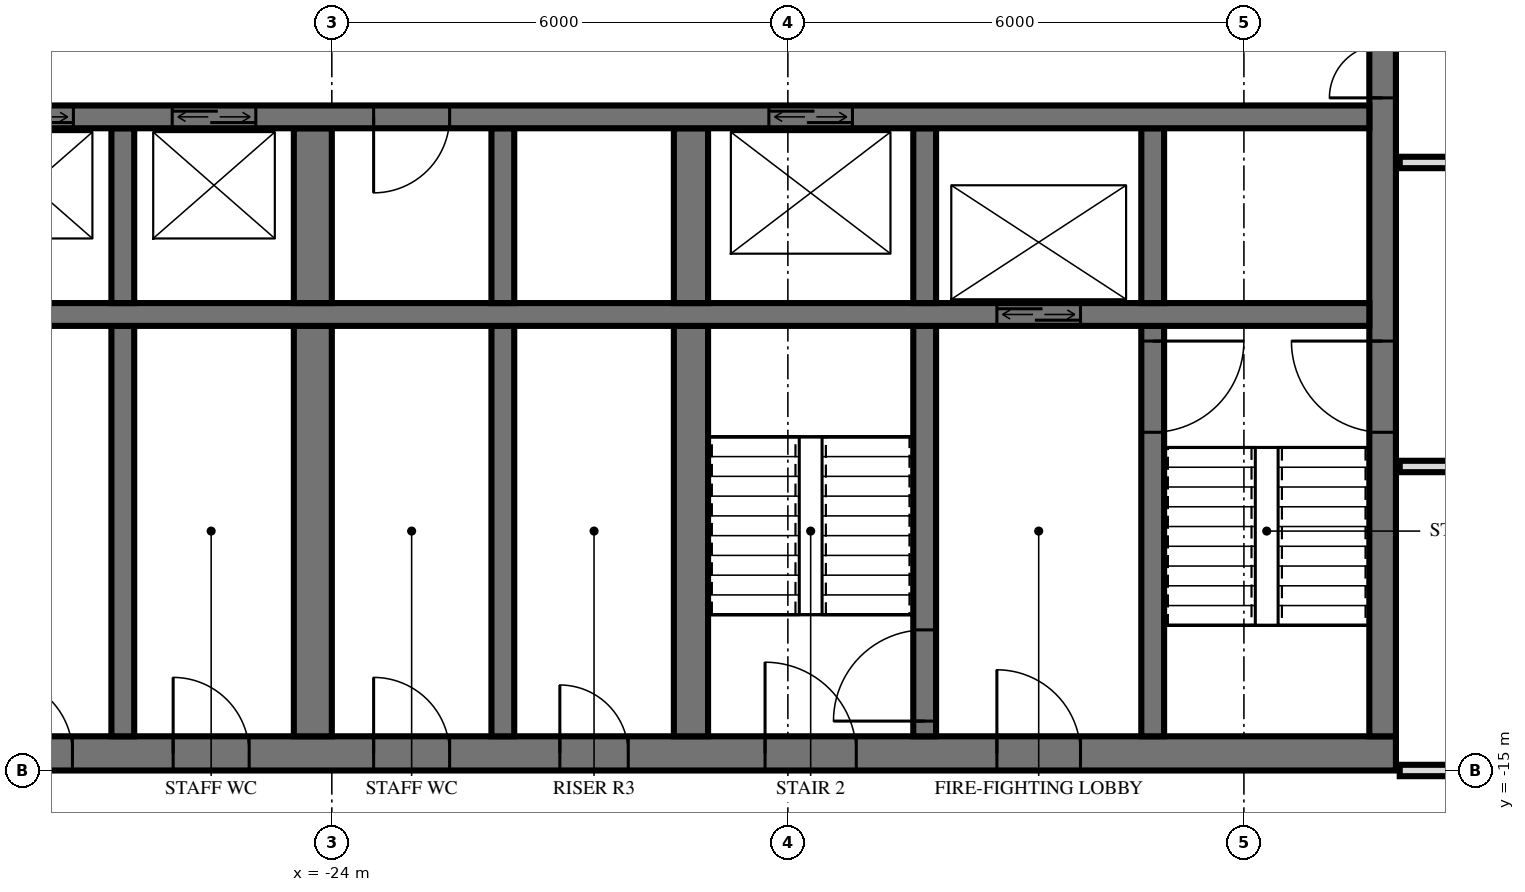
"""IFC4 building model, lengths in metres.
Left out: names, types, materials, properties, quantities, classifications, styles, units other than length and angle.
Written with IfcOpenShell. Run it as: python <this file> out.ifc"""

import sys

from ifc_helpers import new_model, si_unit, direction, frame, frame_2d, origin, place, context, subcontext, project, spatial, rectangle, extrude, element, fill, save


model = new_model("IFC4")
c1 = context("Model", 3, precision=1e-05, world=origin(), true_north=direction((0.0, 1.0)))
c2 = subcontext(c1, "Body", "Model", "MODEL_VIEW")
j1 = project(units=[si_unit("LENGTHUNIT", "METRE"), si_unit("PLANEANGLEUNIT", "RADIAN")], contexts=[c1])
p1 = place(None, origin())
s1 = spatial("IfcSite", under=j1, at=p1, CompositionType="ELEMENT")
p2 = place(p1, origin())
s2 = spatial("IfcBuilding", under=s1, at=p2, CompositionType="ELEMENT")
p3 = place(p2, frame((0.0, 0.0, 96.0)))
s3 = spatial("IfcBuildingStorey", under=s2, at=p3, CompositionType="ELEMENT", Elevation=96.0)
p4 = place(p3, frame((-29.5, -14.775, 0.0), z_axis=(0.0, 0.0, 1.0), x_axis=(1.0, 0.0, 0.0)))
e1 = element("IfcWall", 1, at=p4, inside=s3, PredefinedType="SHEAR", context=c2, shape_type="SweptSolid", body=[
    extrude(rectangle(XDim=19.5, YDim=0.45, at=frame_2d((9.75, 0.0))), origin(), (0.0, 0.0, 1.0), 3.6),
])
p5 = place(p4, frame((11.2, 0.0, 0.0)))
e2 = element("IfcOpeningElement", 2, at=p5, cuts=e1, PredefinedType="OPENING", context=c2, shape_type="SweptSolid", body=[
    extrude(rectangle(XDim=1.2, YDim=2.1, at=frame_2d((0.6, 1.05))), frame((0.0, 0.235, 0.0), z_axis=(0.0, -1.0, 0.0), x_axis=(1.0, 0.0, 0.0)), (0.0, 0.0, 1.0), 0.47),
])
p6 = place(p4, frame((14.25, 0.0, 0.0)))
e3 = element("IfcOpeningElement", 3, at=p6, cuts=e1, PredefinedType="OPENING", context=c2, shape_type="SweptSolid", body=[
    extrude(rectangle(XDim=1.1, YDim=2.1, at=frame_2d((0.55, 1.05))), frame((0.0, 0.235, 0.0), z_axis=(0.0, -1.0, 0.0), x_axis=(1.0, 0.0, 0.0)), (0.0, 0.0, 1.0), 0.47),
])
p7 = place(p4, frame((8.5, 0.0, 0.0)))
e4 = element("IfcOpeningElement", 4, at=p7, cuts=e1, PredefinedType="OPENING", context=c2, shape_type="SweptSolid", body=[
    extrude(rectangle(XDim=0.9, YDim=2.1, at=frame_2d((0.45, 1.05))), frame((0.0, 0.235, 0.0), z_axis=(0.0, -1.0, 0.0), x_axis=(1.0, 0.0, 0.0)), (0.0, 0.0, 1.0), 0.47),
])
p8 = place(p4, frame((6.05, 0.0, 0.0)))
e5 = element("IfcOpeningElement", 5, at=p8, cuts=e1, PredefinedType="OPENING", context=c2, shape_type="SweptSolid", body=[
    extrude(rectangle(XDim=1.0, YDim=2.1, at=frame_2d((0.5, 1.05))), frame((0.0, 0.235, 0.0), z_axis=(0.0, -1.0, 0.0), x_axis=(1.0, 0.0, 0.0)), (0.0, 0.0, 1.0), 0.47),
])
p9 = place(p4, frame((3.413, 0.0, 0.0)))
e6 = element("IfcOpeningElement", 6, at=p9, cuts=e1, PredefinedType="OPENING", context=c2, shape_type="SweptSolid", body=[
    extrude(rectangle(XDim=1.0, YDim=2.1, at=frame_2d((0.5, 1.05))), frame((0.0, 0.235, 0.0), z_axis=(0.0, -1.0, 0.0), x_axis=(1.0, 0.0, 0.0)), (0.0, 0.0, 1.0), 0.47),
])
p10 = place(p4, frame((1.087, 0.0, 0.0)))
e7 = element("IfcOpeningElement", 7, at=p10, cuts=e1, PredefinedType="OPENING", context=c2, shape_type="SweptSolid", body=[
    extrude(rectangle(XDim=1.0, YDim=2.1, at=frame_2d((0.5, 1.05))), frame((0.0, 0.235, 0.0), z_axis=(0.0, -1.0, 0.0), x_axis=(1.0, 0.0, 0.0)), (0.0, 0.0, 1.0), 0.47),
])
p11 = place(p3, frame((-10.175, -14.55, 0.0), z_axis=(0.0, 0.0, 1.0), x_axis=(0.0, 1.0, 0.0)))
e8 = element("IfcWall", 8, at=p11, inside=s3, PredefinedType="SHEAR", context=c2, shape_type="SweptSolid", body=[
    extrude(rectangle(XDim=14.1, YDim=0.35, at=frame_2d((7.05, 0.0))), origin(), (0.0, 0.0, 1.0), 3.6),
])
p12 = place(p11, frame((8.4, 0.0, 0.0)))
e9 = element("IfcOpeningElement", 9, at=p12, cuts=e8, PredefinedType="OPENING", context=c2, shape_type="SweptSolid", body=[
    extrude(rectangle(XDim=1.4, YDim=2.4, at=frame_2d((0.7, 1.2))), frame((0.0, 0.185, 0.0), z_axis=(0.0, -1.0, 0.0), x_axis=(1.0, 0.0, 0.0)), (0.0, 0.0, 1.0), 0.37),
])
p13 = place(p11, frame((10.0, 0.0, 0.0)))
e10 = element("IfcOpeningElement", 10, at=p13, cuts=e8, PredefinedType="OPENING", context=c2, shape_type="SweptSolid", body=[
    extrude(rectangle(XDim=1.4, YDim=2.4, at=frame_2d((0.7, 1.2))), frame((0.0, 0.185, 0.0), z_axis=(0.0, -1.0, 0.0), x_axis=(1.0, 0.0, 0.0)), (0.0, 0.0, 1.0), 0.37),
])
p14 = place(p11, frame((4.0, 0.0, 0.0)))
e11 = element("IfcOpeningElement", 11, at=p14, cuts=e8, PredefinedType="OPENING", context=c2, shape_type="SweptSolid", body=[
    extrude(rectangle(XDim=1.2, YDim=2.1, at=frame_2d((0.6, 1.05))), frame((0.0, 0.185, 0.0), z_axis=(0.0, -1.0, 0.0), x_axis=(1.0, 0.0, 0.0)), (0.0, 0.0, 1.0), 0.37),
])
p15 = place(p3, frame((-29.05, -6.4, 0.0), z_axis=(0.0, 0.0, 1.0), x_axis=(1.0, 0.0, 0.0)))
e12 = element("IfcWall", 12, at=p15, inside=s3, PredefinedType="SHEAR", context=c2, shape_type="SweptSolid", body=[
    extrude(rectangle(XDim=18.7, YDim=0.3, at=frame_2d((9.35, 0.0))), origin(), (0.0, 0.0, 1.0), 3.6),
])
p16 = place(p15, frame((2.95, 0.0, 0.0)))
e13 = element("IfcOpeningElement", 13, at=p16, cuts=e12, PredefinedType="OPENING", context=c2, shape_type="SweptSolid", body=[
    extrude(rectangle(XDim=1.1, YDim=2.1, at=frame_2d((0.55, 1.05))), frame((0.0, 0.16, 0.0), z_axis=(0.0, -1.0, 0.0), x_axis=(1.0, 0.0, 0.0)), (0.0, 0.0, 1.0), 0.32),
])
p17 = place(p15, frame((0.55, 0.0, 0.0)))
e14 = element("IfcOpeningElement", 14, at=p17, cuts=e12, PredefinedType="OPENING", context=c2, shape_type="SweptSolid", body=[
    extrude(rectangle(XDim=1.1, YDim=2.1, at=frame_2d((0.55, 1.05))), frame((0.0, 0.16, 0.0), z_axis=(0.0, -1.0, 0.0), x_axis=(1.0, 0.0, 0.0)), (0.0, 0.0, 1.0), 0.32),
])
p18 = place(p15, frame((10.8, 0.0, 0.0)))
e15 = element("IfcOpeningElement", 15, at=p18, cuts=e12, PredefinedType="OPENING", context=c2, shape_type="SweptSolid", body=[
    extrude(rectangle(XDim=1.1, YDim=2.1, at=frame_2d((0.55, 1.05))), frame((0.0, 0.16, 0.0), z_axis=(0.0, -1.0, 0.0), x_axis=(1.0, 0.0, 0.0)), (0.0, 0.0, 1.0), 0.32),
])
p19 = place(p15, frame((5.6, 0.0, 0.0)))
e16 = element("IfcOpeningElement", 16, at=p19, cuts=e12, PredefinedType="OPENING", context=c2, shape_type="SweptSolid", body=[
    extrude(rectangle(XDim=1.0, YDim=2.1, at=frame_2d((0.5, 1.05))), frame((0.0, 0.16, 0.0), z_axis=(0.0, -1.0, 0.0), x_axis=(1.0, 0.0, 0.0)), (0.0, 0.0, 1.0), 0.32),
])
p20 = place(p3, frame((-29.05, -9.0, 0.0), z_axis=(0.0, 0.0, 1.0), x_axis=(1.0, 0.0, 0.0)))
e17 = element("IfcWall", 17, at=p20, inside=s3, PredefinedType="SHEAR", context=c2, shape_type="SweptSolid", body=[
    extrude(rectangle(XDim=18.7, YDim=0.3, at=frame_2d((9.35, 0.0))), origin(), (0.0, 0.0, 1.0), 3.6),
])
p21 = place(p20, frame((13.8, 0.0, 0.0)))
e18 = element("IfcOpeningElement", 18, at=p21, cuts=e17, PredefinedType="OPENING", context=c2, shape_type="SweptSolid", body=[
    extrude(rectangle(XDim=1.1, YDim=2.1, at=frame_2d((0.55, 1.05))), frame((0.0, 0.16, 0.0), z_axis=(0.0, -1.0, 0.0), x_axis=(1.0, 0.0, 0.0)), (0.0, 0.0, 1.0), 0.32),
])
p22 = place(p3, frame((-13.2, -8.85, 0.0), z_axis=(0.0, 0.0, 1.0), x_axis=(0.0, 1.0, 0.0)))
e19 = element("IfcWall", 19, at=p22, inside=s3, PredefinedType="SHEAR", context=c2, shape_type="SweptSolid", body=[
    extrude(rectangle(XDim=2.3, YDim=0.3, at=frame_2d((1.15, 0.0))), origin(), (0.0, 0.0, 1.0), 3.6),
])
p23 = place(p3, frame((-13.2, -14.55, 0.0), z_axis=(0.0, 0.0, 1.0), x_axis=(0.0, 1.0, 0.0)))
e20 = element("IfcWall", 20, at=p23, inside=s3, PredefinedType="SHEAR", context=c2, shape_type="SweptSolid", body=[
    extrude(rectangle(XDim=5.4, YDim=0.3, at=frame_2d((2.7, 0.0))), origin(), (0.0, 0.0, 1.0), 3.6),
])
p24 = place(p23, frame((4.0, 0.0, 0.0)))
e21 = element("IfcOpeningElement", 21, at=p24, cuts=e20, PredefinedType="OPENING", context=c2, shape_type="SweptSolid", body=[
    extrude(rectangle(XDim=1.2, YDim=2.1, at=frame_2d((0.6, 1.05))), frame((0.0, 0.16, 0.0), z_axis=(0.0, -1.0, 0.0), x_axis=(1.0, 0.0, 0.0)), (0.0, 0.0, 1.0), 0.32),
])
p25 = place(p3, frame((-16.2, -8.85, 0.0), z_axis=(0.0, 0.0, 1.0), x_axis=(0.0, 1.0, 0.0)))
e22 = element("IfcWall", 22, at=p25, inside=s3, PredefinedType="SHEAR", context=c2, shape_type="SweptSolid", body=[
    extrude(rectangle(XDim=2.3, YDim=0.3, at=frame_2d((1.15, 0.0))), origin(), (0.0, 0.0, 1.0), 3.6),
])
p26 = place(p3, frame((-16.2, -14.55, 0.0), z_axis=(0.0, 0.0, 1.0), x_axis=(0.0, 1.0, 0.0)))
e23 = element("IfcWall", 23, at=p26, inside=s3, PredefinedType="SHEAR", context=c2, shape_type="SweptSolid", body=[
    extrude(rectangle(XDim=5.4, YDim=0.3, at=frame_2d((2.7, 0.0))), origin(), (0.0, 0.0, 1.0), 3.6),
])
p27 = place(p26, frame((0.2, 0.0, 0.0)))
e24 = element("IfcOpeningElement", 24, at=p27, cuts=e23, PredefinedType="OPENING", context=c2, shape_type="SweptSolid", body=[
    extrude(rectangle(XDim=1.2, YDim=2.1, at=frame_2d((0.6, 1.05))), frame((0.0, 0.16, 0.0), z_axis=(0.0, -1.0, 0.0), x_axis=(1.0, 0.0, 0.0)), (0.0, 0.0, 1.0), 0.32),
])
p28 = place(p3, frame((-19.275, -8.85, 0.0), z_axis=(0.0, 0.0, 1.0), x_axis=(0.0, 1.0, 0.0)))
e25 = element("IfcWall", 25, at=p28, inside=s3, PredefinedType="SHEAR", context=c2, shape_type="SweptSolid", body=[
    extrude(rectangle(XDim=2.3, YDim=0.45, at=frame_2d((1.15, 0.0))), origin(), (0.0, 0.0, 1.0), 3.6),
])
p29 = place(p3, frame((-19.275, -14.55, 0.0), z_axis=(0.0, 0.0, 1.0), x_axis=(0.0, 1.0, 0.0)))
e26 = element("IfcWall", 26, at=p29, inside=s3, PredefinedType="SHEAR", context=c2, shape_type="SweptSolid", body=[
    extrude(rectangle(XDim=5.4, YDim=0.45, at=frame_2d((2.7, 0.0))), origin(), (0.0, 0.0, 1.0), 3.6),
])
p30 = place(p3, frame((-21.75, -8.85, 0.0), z_axis=(0.0, 0.0, 1.0), x_axis=(0.0, 1.0, 0.0)))
e27 = element("IfcWall", 27, at=p30, inside=s3, PredefinedType="SHEAR", context=c2, shape_type="SweptSolid", body=[
    extrude(rectangle(XDim=2.3, YDim=0.3, at=frame_2d((1.15, 0.0))), origin(), (0.0, 0.0, 1.0), 3.6),
])
p31 = place(p3, frame((-21.75, -14.55, 0.0), z_axis=(0.0, 0.0, 1.0), x_axis=(0.0, 1.0, 0.0)))
e28 = element("IfcWall", 28, at=p31, inside=s3, PredefinedType="SHEAR", context=c2, shape_type="SweptSolid", body=[
    extrude(rectangle(XDim=5.4, YDim=0.3, at=frame_2d((2.7, 0.0))), origin(), (0.0, 0.0, 1.0), 3.6),
])
p32 = place(p3, frame((-24.25, -8.85, 0.0), z_axis=(0.0, 0.0, 1.0), x_axis=(0.0, 1.0, 0.0)))
e29 = element("IfcWall", 29, at=p32, inside=s3, PredefinedType="SHEAR", context=c2, shape_type="SweptSolid", body=[
    extrude(rectangle(XDim=2.3, YDim=0.5, at=frame_2d((1.15, 0.0))), origin(), (0.0, 0.0, 1.0), 3.6),
])
p33 = place(p3, frame((-24.25, -14.55, 0.0), z_axis=(0.0, 0.0, 1.0), x_axis=(0.0, 1.0, 0.0)))
e30 = element("IfcWall", 30, at=p33, inside=s3, PredefinedType="SHEAR", context=c2, shape_type="SweptSolid", body=[
    extrude(rectangle(XDim=5.4, YDim=0.5, at=frame_2d((2.7, 0.0))), origin(), (0.0, 0.0, 1.0), 3.6),
])
p34 = place(p3, frame((-26.75, -8.85, 0.0), z_axis=(0.0, 0.0, 1.0), x_axis=(0.0, 1.0, 0.0)))
e31 = element("IfcWall", 31, at=p34, inside=s3, PredefinedType="SHEAR", context=c2, shape_type="SweptSolid", body=[
    extrude(rectangle(XDim=2.3, YDim=0.3, at=frame_2d((1.15, 0.0))), origin(), (0.0, 0.0, 1.0), 3.6),
])
p35 = place(p3, frame((-26.75, -14.55, 0.0), z_axis=(0.0, 0.0, 1.0), x_axis=(0.0, 1.0, 0.0)))
e32 = element("IfcWall", 32, at=p35, inside=s3, PredefinedType="SHEAR", context=c2, shape_type="SweptSolid", body=[
    extrude(rectangle(XDim=5.4, YDim=0.3, at=frame_2d((2.7, 0.0))), origin(), (0.0, 0.0, 1.0), 3.6),
])
p36 = place(p3, frame((-9.95, -15.0, 0.0), z_axis=(0.0, 0.0, 1.0), x_axis=(1.0, 0.0, 0.0)))
e33 = element("IfcWall", 33, at=p36, inside=s3, PredefinedType="PARTITIONING", context=c2, shape_type="SweptSolid", body=[
    extrude(rectangle(XDim=19.9, YDim=0.15, at=frame_2d((9.95, 0.0))), origin(), (0.0, 0.0, 1.0), 2.684),
])
p37 = place(p36, frame((9.45, 0.0, 0.0)))
e34 = element("IfcOpeningElement", 34, at=p37, cuts=e33, PredefinedType="OPENING", context=c2, shape_type="SweptSolid", body=[
    extrude(rectangle(XDim=1.0, YDim=2.1, at=frame_2d((0.5, 1.05))), frame((0.0, 0.085, 0.0), z_axis=(0.0, -1.0, 0.0), x_axis=(1.0, 0.0, 0.0)), (0.0, 0.0, 1.0), 0.17),
])
p38 = place(p3, frame((-9.95, -11.0, 0.0), z_axis=(0.0, 0.0, 1.0), x_axis=(1.0, 0.0, 0.0)))
e35 = element("IfcWall", 35, at=p38, inside=s3, PredefinedType="PARTITIONING", context=c2, shape_type="SweptSolid", body=[
    extrude(rectangle(XDim=19.9, YDim=0.15, at=frame_2d((9.95, 0.0))), origin(), (0.0, 0.0, 1.0), 3.32),
])
p39 = place(p38, frame((9.45, 0.0, 0.0)))
e36 = element("IfcOpeningElement", 36, at=p39, cuts=e35, PredefinedType="OPENING", context=c2, shape_type="SweptSolid", body=[
    extrude(rectangle(XDim=1.0, YDim=2.1, at=frame_2d((0.5, 1.05))), frame((0.0, 0.085, 0.0), z_axis=(0.0, -1.0, 0.0), x_axis=(1.0, 0.0, 0.0)), (0.0, 0.0, 1.0), 0.17),
])
p40 = place(p38, frame((15.45, 0.0, 0.0)))
e37 = element("IfcOpeningElement", 37, at=p40, cuts=e35, PredefinedType="OPENING", context=c2, shape_type="SweptSolid", body=[
    extrude(rectangle(XDim=1.0, YDim=2.1, at=frame_2d((0.5, 1.05))), frame((0.0, 0.085, 0.0), z_axis=(0.0, -1.0, 0.0), x_axis=(1.0, 0.0, 0.0)), (0.0, 0.0, 1.0), 0.17),
])
p41 = place(p3, frame((-9.95, -7.0, 0.0), z_axis=(0.0, 0.0, 1.0), x_axis=(1.0, 0.0, 0.0)))
e38 = element("IfcWall", 38, at=p41, inside=s3, PredefinedType="PARTITIONING", context=c2, shape_type="SweptSolid", body=[
    extrude(rectangle(XDim=19.9, YDim=0.15, at=frame_2d((9.95, 0.0))), origin(), (0.0, 0.0, 1.0), 3.32),
])
p42 = place(p41, frame((9.45, 0.0, 0.0)))
e39 = element("IfcOpeningElement", 39, at=p42, cuts=e38, PredefinedType="OPENING", context=c2, shape_type="SweptSolid", body=[
    extrude(rectangle(XDim=1.0, YDim=2.1, at=frame_2d((0.5, 1.05))), frame((0.0, 0.085, 0.0), z_axis=(0.0, -1.0, 0.0), x_axis=(1.0, 0.0, 0.0)), (0.0, 0.0, 1.0), 0.17),
])
p43 = place(p41, frame((3.45, 0.0, 0.0)))
e40 = element("IfcOpeningElement", 40, at=p43, cuts=e38, PredefinedType="OPENING", context=c2, shape_type="SweptSolid", body=[
    extrude(rectangle(XDim=1.0, YDim=2.1, at=frame_2d((0.5, 1.05))), frame((0.0, 0.085, 0.0), z_axis=(0.0, -1.0, 0.0), x_axis=(1.0, 0.0, 0.0)), (0.0, 0.0, 1.0), 0.17),
])
p44 = place(p16, origin())
e41 = element("IfcDoor", 41, at=p44, inside=s3, OperationType="DOUBLE_DOOR_SLIDING", PredefinedType="USERDEFINED", context=c2, shape_type="SweptSolid", body=[
    extrude(rectangle(XDim=1.1, YDim=2.1, at=frame_2d((0.55, 1.05))), frame((0.0, 0.025, 0.0), z_axis=(0.0, -1.0, 0.0), x_axis=(1.0, 0.0, 0.0)), (0.0, 0.0, 1.0), 0.05),
])
fill(e13, e41)
p45 = place(p17, origin())
e42 = element("IfcDoor", 42, at=p45, inside=s3, OperationType="DOUBLE_DOOR_SLIDING", PredefinedType="USERDEFINED", context=c2, shape_type="SweptSolid", body=[
    extrude(rectangle(XDim=1.1, YDim=2.1, at=frame_2d((0.55, 1.05))), frame((0.0, 0.025, 0.0), z_axis=(0.0, -1.0, 0.0), x_axis=(1.0, 0.0, 0.0)), (0.0, 0.0, 1.0), 0.05),
])
fill(e14, e42)
p46 = place(p21, origin())
e43 = element("IfcDoor", 43, at=p46, inside=s3, OperationType="DOUBLE_DOOR_SLIDING", PredefinedType="USERDEFINED", context=c2, shape_type="SweptSolid", body=[
    extrude(rectangle(XDim=1.1, YDim=2.1, at=frame_2d((0.55, 1.05))), frame((0.0, 0.025, 0.0), z_axis=(0.0, -1.0, 0.0), x_axis=(1.0, 0.0, 0.0)), (0.0, 0.0, 1.0), 0.05),
])
fill(e18, e43)
p47 = place(p18, origin())
e44 = element("IfcDoor", 44, at=p47, inside=s3, OperationType="DOUBLE_DOOR_SLIDING", PredefinedType="USERDEFINED", context=c2, shape_type="SweptSolid", body=[
    extrude(rectangle(XDim=1.1, YDim=2.1, at=frame_2d((0.55, 1.05))), frame((0.0, 0.025, 0.0), z_axis=(0.0, -1.0, 0.0), x_axis=(1.0, 0.0, 0.0)), (0.0, 0.0, 1.0), 0.05),
])
fill(e15, e44)
p48 = place(p12, origin())
e45 = element("IfcDoor", 45, at=p48, inside=s3, OperationType="DOUBLE_DOOR_SINGLE_SWING", PredefinedType="DOOR", context=c2, shape_type="SweptSolid", body=[
    extrude(rectangle(XDim=1.4, YDim=2.4, at=frame_2d((0.7, 1.2))), frame((0.0, 0.025, 0.0), z_axis=(0.0, -1.0, 0.0), x_axis=(1.0, 0.0, 0.0)), (0.0, 0.0, 1.0), 0.05),
])
fill(e9, e45)
p49 = place(p14, origin())
e46 = element("IfcDoor", 46, at=p49, inside=s3, OperationType="SINGLE_SWING_LEFT", PredefinedType="DOOR", context=c2, shape_type="SweptSolid", body=[
    extrude(rectangle(XDim=1.2, YDim=2.1, at=frame_2d((0.6, 1.05))), frame((0.0, 0.025, 0.0), z_axis=(0.0, -1.0, 0.0), x_axis=(1.0, 0.0, 0.0)), (0.0, 0.0, 1.0), 0.05),
])
fill(e11, e46)
p50 = place(p5, origin())
e47 = element("IfcDoor", 47, at=p50, inside=s3, OperationType="SINGLE_SWING_RIGHT", PredefinedType="DOOR", context=c2, shape_type="SweptSolid", body=[
    extrude(rectangle(XDim=1.2, YDim=2.1, at=frame_2d((0.6, 1.05))), frame((0.0, 0.025, 0.0), z_axis=(0.0, -1.0, 0.0), x_axis=(1.0, 0.0, 0.0)), (0.0, 0.0, 1.0), 0.05),
])
fill(e2, e47)
p51 = place(p6, origin())
e48 = element("IfcDoor", 48, at=p51, inside=s3, OperationType="SINGLE_SWING_RIGHT", PredefinedType="DOOR", context=c2, shape_type="SweptSolid", body=[
    extrude(rectangle(XDim=1.1, YDim=2.1, at=frame_2d((0.55, 1.05))), frame((0.0, 0.025, 0.0), z_axis=(0.0, -1.0, 0.0), x_axis=(1.0, 0.0, 0.0)), (0.0, 0.0, 1.0), 0.05),
])
fill(e3, e48)
p52 = place(p7, origin())
e49 = element("IfcDoor", 49, at=p52, inside=s3, OperationType="SINGLE_SWING_RIGHT", PredefinedType="DOOR", context=c2, shape_type="SweptSolid", body=[
    extrude(rectangle(XDim=0.9, YDim=2.1, at=frame_2d((0.45, 1.05))), frame((0.0, 0.025, 0.0), z_axis=(0.0, -1.0, 0.0), x_axis=(1.0, 0.0, 0.0)), (0.0, 0.0, 1.0), 0.05),
])
fill(e4, e49)
p53 = place(p8, origin())
e50 = element("IfcDoor", 50, at=p53, inside=s3, OperationType="SINGLE_SWING_RIGHT", PredefinedType="DOOR", context=c2, shape_type="SweptSolid", body=[
    extrude(rectangle(XDim=1.0, YDim=2.1, at=frame_2d((0.5, 1.05))), frame((0.0, 0.025, 0.0), z_axis=(0.0, -1.0, 0.0), x_axis=(1.0, 0.0, 0.0)), (0.0, 0.0, 1.0), 0.05),
])
fill(e5, e50)
p54 = place(p9, origin())
e51 = element("IfcDoor", 51, at=p54, inside=s3, OperationType="SINGLE_SWING_RIGHT", PredefinedType="DOOR", context=c2, shape_type="SweptSolid", body=[
    extrude(rectangle(XDim=1.0, YDim=2.1, at=frame_2d((0.5, 1.05))), frame((0.0, 0.025, 0.0), z_axis=(0.0, -1.0, 0.0), x_axis=(1.0, 0.0, 0.0)), (0.0, 0.0, 1.0), 0.05),
])
fill(e6, e51)
p55 = place(p10, origin())
e52 = element("IfcDoor", 52, at=p55, inside=s3, OperationType="SINGLE_SWING_RIGHT", PredefinedType="DOOR", context=c2, shape_type="SweptSolid", body=[
    extrude(rectangle(XDim=1.0, YDim=2.1, at=frame_2d((0.5, 1.05))), frame((0.0, 0.025, 0.0), z_axis=(0.0, -1.0, 0.0), x_axis=(1.0, 0.0, 0.0)), (0.0, 0.0, 1.0), 0.05),
])
fill(e7, e52)
p56 = place(p19, frame((0.5, 0.0, 0.0), z_axis=(0.0, 0.0, 1.0), x_axis=(-1.0, 0.0, 0.0)))
e53 = element("IfcDoor", 53, at=p56, inside=s3, OperationType="SINGLE_SWING_LEFT", PredefinedType="DOOR", context=c2, shape_type="SweptSolid", body=[
    extrude(rectangle(XDim=1.0, YDim=2.1, at=frame_2d((0.0, 1.05))), frame((0.0, -0.025, 0.0), z_axis=(0.0, 1.0, 0.0), x_axis=(-1.0, 0.0, 0.0)), (0.0, 0.0, 1.0), 0.05),
])
fill(e16, e53)
p57 = place(p24, frame((0.6, 0.0, 0.0), z_axis=(0.0, 0.0, 1.0), x_axis=(-1.0, 0.0, 0.0)))
e54 = element("IfcDoor", 54, at=p57, inside=s3, OperationType="SINGLE_SWING_RIGHT", PredefinedType="DOOR", context=c2, shape_type="SweptSolid", body=[
    extrude(rectangle(XDim=1.2, YDim=2.1, at=frame_2d((0.0, 1.05))), frame((0.0, -0.025, 0.0), z_axis=(0.0, 1.0, 0.0), x_axis=(-1.0, 0.0, 0.0)), (0.0, 0.0, 1.0), 0.05),
])
fill(e21, e54)
p58 = place(p27, origin())
e55 = element("IfcDoor", 55, at=p58, inside=s3, OperationType="SINGLE_SWING_RIGHT", PredefinedType="DOOR", context=c2, shape_type="SweptSolid", body=[
    extrude(rectangle(XDim=1.2, YDim=2.1, at=frame_2d((0.6, 1.05))), frame((0.0, 0.025, 0.0), z_axis=(0.0, -1.0, 0.0), x_axis=(1.0, 0.0, 0.0)), (0.0, 0.0, 1.0), 0.05),
])
fill(e24, e55)
save(model, sys.argv[1])
